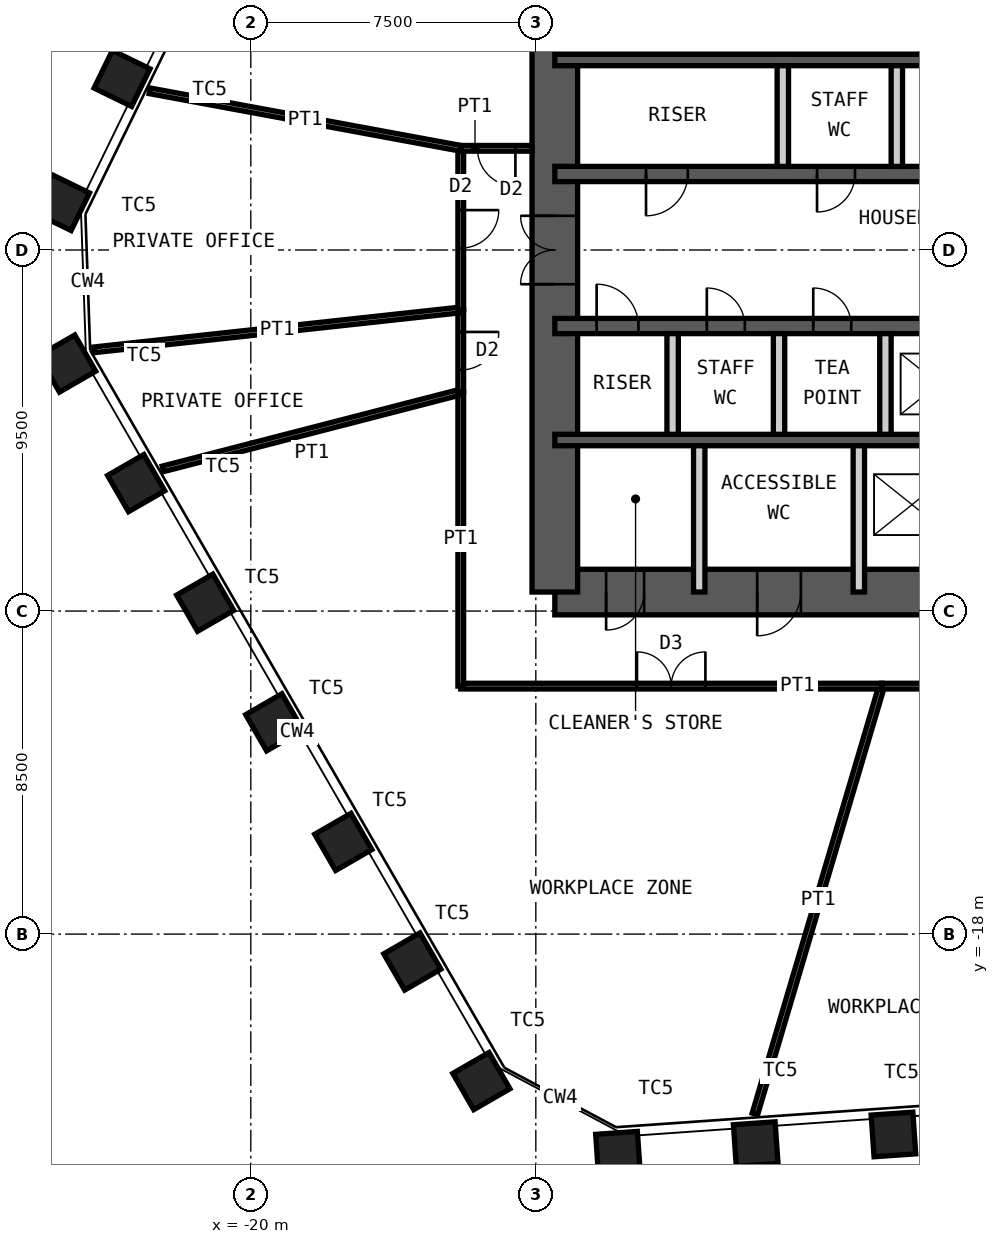
"""IFC4 building model, lengths in metres.
Left out: names, types, materials, properties, quantities, classifications, styles, units other than length and angle.
Written with IfcOpenShell. Run it as: python <this file> out.ifc"""

import sys

from ifc_helpers import new_model, si_unit, direction, frame, frame_2d, origin, origin_2d, place, context, subcontext, project, spatial, rectangle, hollow_rectangle, extrude, element, fill, save


model = new_model("IFC4")
c1 = context("Model", 3, precision=1e-05, world=origin(), true_north=direction((0.0, 1.0)))
c2 = subcontext(c1, "Body", "Model", "MODEL_VIEW")
j1 = project(units=[si_unit("LENGTHUNIT", "METRE"), si_unit("PLANEANGLEUNIT", "RADIAN")], contexts=[c1])
p1 = place(None, origin())
s1 = spatial("IfcSite", under=j1, at=p1, CompositionType="ELEMENT")
p2 = place(p1, origin())
s2 = spatial("IfcBuilding", under=s1, at=p2, CompositionType="ELEMENT")
p3 = place(p2, frame((0.0, 0.0, 205.6)))
s3 = spatial("IfcBuildingStorey", under=s2, at=p3, CompositionType="ELEMENT", Elevation=205.6)
for number, where, z_axis, x_axis in (
    (1, (-3.089, -23.272, 0.0), (0.0, 0.0, 1.0), (0.998, 0.07, 0.0)),
    (2, (-6.714, -23.526, 0.0), (0.0, 0.0, 1.0), (0.998, 0.07, 0.0)),
    (3, (-10.338, -23.779, 0.0), (0.0, 0.0, 1.0), (0.998, 0.07, 0.0)),
    (4, (-13.933, -21.868, 0.0), (0.0, 0.0, 1.0), (0.5, -0.866, 0.0)),
    (5, (-15.749, -18.721, 0.0), (0.0, 0.0, 1.0), (0.5, -0.866, 0.0)),
    (6, (-17.566, -15.574, 0.0), (0.0, 0.0, 1.0), (0.5, -0.866, 0.0)),
    (7, (-19.383, -12.428, 0.0), (0.0, 0.0, 1.0), (0.5, -0.866, 0.0)),
    (8, (-21.2, -9.281, 0.0), (0.0, 0.0, 1.0), (0.5, -0.866, 0.0)),
    (9, (-23.016, -6.134, 0.0), (0.0, 0.0, 1.0), (0.5, -0.866, 0.0)),
    (10, (-24.833, -2.988, 0.0), (0.0, 0.0, 1.0), (0.5, -0.866, 0.0)),
    (11, (-24.981, 1.248, 0.0), (0.0, 0.0, 1.0), (-0.438, -0.899, 0.0)),
    (12, (-23.388, 4.514, 0.0), (0.0, 0.0, 1.0), (-0.438, -0.899, 0.0)),
):
    element("IfcColumn", number, at=place(p3, frame(where, z_axis=z_axis, x_axis=x_axis)), inside=s3, PredefinedType="COLUMN", context=c2, shape_type="SweptSolid", body=[
        extrude(hollow_rectangle(XDim=1.1, YDim=1.1, WallThickness=0.07, at=origin_2d()), origin(), (0.0, 0.0, 1.0), 4.2),
    ])
p4 = place(p3, frame((-12.0, -9.0, 0.0), z_axis=(0.0, 0.0, 1.0), x_axis=(1.0, 0.0, 0.0)))
e13 = element("IfcWall", 13, at=p4, inside=s3, PredefinedType="SHEAR", context=c2, shape_type="SweptSolid", body=[
    extrude(rectangle(XDim=24.0, YDim=1.2, at=frame_2d((12.0, 0.0))), origin(), (0.0, 0.0, 1.0), 4.2),
])
p5 = place(p4, frame((1.35, 0.0, 0.0)))
e14 = element("IfcOpeningElement", 14, at=p5, cuts=e13, PredefinedType="OPENING", context=c2, shape_type="SweptSolid", body=[
    extrude(rectangle(XDim=1.0, YDim=2.1, at=frame_2d((0.5, 1.05))), frame((0.0, 0.61, 0.0), z_axis=(0.0, -1.0, 0.0), x_axis=(1.0, 0.0, 0.0)), (0.0, 0.0, 1.0), 1.22),
])
p6 = place(p4, frame((5.325, 0.0, 0.0)))
e15 = element("IfcOpeningElement", 15, at=p6, cuts=e13, PredefinedType="OPENING", context=c2, shape_type="SweptSolid", body=[
    extrude(rectangle(XDim=1.15, YDim=2.1, at=frame_2d((0.575, 1.05))), frame((0.0, 0.61, 0.0), z_axis=(0.0, -1.0, 0.0), x_axis=(1.0, 0.0, 0.0)), (0.0, 0.0, 1.0), 1.22),
])
p7 = place(p4, frame((12.6, 0.0, 0.0)))
e16 = element("IfcOpeningElement", 16, at=p7, cuts=e13, PredefinedType="OPENING", context=c2, shape_type="SweptSolid", body=[
    extrude(rectangle(XDim=1.0, YDim=2.1, at=frame_2d((0.5, 1.05))), frame((0.0, 0.61, 0.0), z_axis=(0.0, -1.0, 0.0), x_axis=(1.0, 0.0, 0.0)), (0.0, 0.0, 1.0), 1.22),
])
p8 = place(p3, frame((-12.0, -9.0, 0.0), z_axis=(0.0, 0.0, 1.0), x_axis=(0.0, 1.0, 0.0)))
e17 = element("IfcWall", 17, at=p8, inside=s3, PredefinedType="SHEAR", context=c2, shape_type="SweptSolid", body=[
    extrude(rectangle(XDim=18.0, YDim=1.2, at=frame_2d((9.0, 0.0))), origin(), (0.0, 0.0, 1.0), 4.2),
])
p9 = place(p8, frame((8.1, 0.0, 0.0)))
e18 = element("IfcOpeningElement", 18, at=p9, cuts=e17, PredefinedType="OPENING", context=c2, shape_type="SweptSolid", body=[
    extrude(rectangle(XDim=1.8, YDim=2.1, at=frame_2d((0.9, 1.05))), frame((0.0, 0.61, 0.0), z_axis=(0.0, -1.0, 0.0), x_axis=(1.0, 0.0, 0.0)), (0.0, 0.0, 1.0), 1.22),
])
p10 = place(p3, frame((-12.0, 5.0, 0.0), z_axis=(0.0, 0.0, 1.0), x_axis=(1.0, 0.0, 0.0)))
e19 = element("IfcWall", 19, at=p10, inside=s3, PredefinedType="SHEAR", context=c2, shape_type="SweptSolid", body=[
    extrude(rectangle(XDim=24.0, YDim=0.3, at=frame_2d((12.0, 0.0))), origin(), (0.0, 0.0, 1.0), 4.2),
])
p11 = place(p3, frame((-12.0, 2.0, 0.0), z_axis=(0.0, 0.0, 1.0), x_axis=(1.0, 0.0, 0.0)))
e20 = element("IfcWall", 20, at=p11, inside=s3, PredefinedType="SHEAR", context=c2, shape_type="SweptSolid", body=[
    extrude(rectangle(XDim=24.0, YDim=0.4, at=frame_2d((12.0, 0.0))), origin(), (0.0, 0.0, 1.0), 4.2),
])
p12 = place(p11, frame((2.4, 0.0, 0.0)))
e21 = element("IfcOpeningElement", 21, at=p12, cuts=e20, PredefinedType="OPENING", context=c2, shape_type="SweptSolid", body=[
    extrude(rectangle(XDim=1.1, YDim=2.1, at=frame_2d((0.55, 1.05))), frame((0.0, 0.21, 0.0), z_axis=(0.0, -1.0, 0.0), x_axis=(1.0, 0.0, 0.0)), (0.0, 0.0, 1.0), 0.42),
])
p13 = place(p11, frame((22.0, 0.0, 0.0)))
e22 = element("IfcOpeningElement", 22, at=p13, cuts=e20, PredefinedType="OPENING", context=c2, shape_type="SweptSolid", body=[
    extrude(rectangle(XDim=1.1, YDim=2.1, at=frame_2d((0.55, 1.05))), frame((0.0, 0.21, 0.0), z_axis=(0.0, -1.0, 0.0), x_axis=(1.0, 0.0, 0.0)), (0.0, 0.0, 1.0), 0.42),
])
p14 = place(p11, frame((10.15, 0.0, 0.0)))
e23 = element("IfcOpeningElement", 23, at=p14, cuts=e20, PredefinedType="OPENING", context=c2, shape_type="SweptSolid", body=[
    extrude(rectangle(XDim=1.0, YDim=2.1, at=frame_2d((0.5, 1.05))), frame((0.0, 0.21, 0.0), z_axis=(0.0, -1.0, 0.0), x_axis=(1.0, 0.0, 0.0)), (0.0, 0.0, 1.0), 0.42),
])
p15 = place(p11, frame((6.9, 0.0, 0.0)))
e24 = element("IfcOpeningElement", 24, at=p15, cuts=e20, PredefinedType="OPENING", context=c2, shape_type="SweptSolid", body=[
    extrude(rectangle(XDim=1.0, YDim=2.1, at=frame_2d((0.5, 1.05))), frame((0.0, 0.21, 0.0), z_axis=(0.0, -1.0, 0.0), x_axis=(1.0, 0.0, 0.0)), (0.0, 0.0, 1.0), 0.42),
])
p16 = place(p11, frame((13.35, 0.0, 0.0)))
e25 = element("IfcOpeningElement", 25, at=p16, cuts=e20, PredefinedType="OPENING", context=c2, shape_type="SweptSolid", body=[
    extrude(rectangle(XDim=1.1, YDim=2.4, at=frame_2d((0.55, 1.2))), frame((0.0, 0.21, 0.0), z_axis=(0.0, -1.0, 0.0), x_axis=(1.0, 0.0, 0.0)), (0.0, 0.0, 1.0), 0.42),
])
p17 = place(p11, frame((16.15, 0.0, 0.0)))
e26 = element("IfcOpeningElement", 26, at=p17, cuts=e20, PredefinedType="OPENING", context=c2, shape_type="SweptSolid", body=[
    extrude(rectangle(XDim=1.1, YDim=2.4, at=frame_2d((0.55, 1.2))), frame((0.0, 0.21, 0.0), z_axis=(0.0, -1.0, 0.0), x_axis=(1.0, 0.0, 0.0)), (0.0, 0.0, 1.0), 0.42),
])
p18 = place(p11, frame((18.95, 0.0, 0.0)))
e27 = element("IfcOpeningElement", 27, at=p18, cuts=e20, PredefinedType="OPENING", context=c2, shape_type="SweptSolid", body=[
    extrude(rectangle(XDim=1.1, YDim=2.4, at=frame_2d((0.55, 1.2))), frame((0.0, 0.21, 0.0), z_axis=(0.0, -1.0, 0.0), x_axis=(1.0, 0.0, 0.0)), (0.0, 0.0, 1.0), 0.42),
])
p19 = place(p3, frame((-12.0, -2.0, 0.0), z_axis=(0.0, 0.0, 1.0), x_axis=(1.0, 0.0, 0.0)))
e28 = element("IfcWall", 28, at=p19, inside=s3, PredefinedType="SHEAR", context=c2, shape_type="SweptSolid", body=[
    extrude(rectangle(XDim=24.0, YDim=0.4, at=frame_2d((12.0, 0.0))), origin(), (0.0, 0.0, 1.0), 4.2),
])
p20 = place(p19, frame((1.1, 0.0, 0.0)))
e29 = element("IfcOpeningElement", 29, at=p20, cuts=e28, PredefinedType="OPENING", context=c2, shape_type="SweptSolid", body=[
    extrude(rectangle(XDim=1.1, YDim=2.1, at=frame_2d((0.55, 1.05))), frame((0.0, 0.21, 0.0), z_axis=(0.0, -1.0, 0.0), x_axis=(1.0, 0.0, 0.0)), (0.0, 0.0, 1.0), 0.42),
])
p21 = place(p19, frame((13.55, 0.0, 0.0)))
e30 = element("IfcOpeningElement", 30, at=p21, cuts=e28, PredefinedType="OPENING", context=c2, shape_type="SweptSolid", body=[
    extrude(rectangle(XDim=1.1, YDim=2.1, at=frame_2d((0.55, 1.05))), frame((0.0, 0.21, 0.0), z_axis=(0.0, -1.0, 0.0), x_axis=(1.0, 0.0, 0.0)), (0.0, 0.0, 1.0), 0.42),
])
p22 = place(p19, frame((20.7, 0.0, 0.0)))
e31 = element("IfcOpeningElement", 31, at=p22, cuts=e28, PredefinedType="OPENING", context=c2, shape_type="SweptSolid", body=[
    extrude(rectangle(XDim=1.1, YDim=2.1, at=frame_2d((0.55, 1.05))), frame((0.0, 0.21, 0.0), z_axis=(0.0, -1.0, 0.0), x_axis=(1.0, 0.0, 0.0)), (0.0, 0.0, 1.0), 0.42),
])
p23 = place(p19, frame((4.0, 0.0, 0.0)))
e32 = element("IfcOpeningElement", 32, at=p23, cuts=e28, PredefinedType="OPENING", context=c2, shape_type="SweptSolid", body=[
    extrude(rectangle(XDim=1.0, YDim=2.1, at=frame_2d((0.5, 1.05))), frame((0.0, 0.21, 0.0), z_axis=(0.0, -1.0, 0.0), x_axis=(1.0, 0.0, 0.0)), (0.0, 0.0, 1.0), 0.42),
])
p24 = place(p19, frame((6.8, 0.0, 0.0)))
e33 = element("IfcOpeningElement", 33, at=p24, cuts=e28, PredefinedType="OPENING", context=c2, shape_type="SweptSolid", body=[
    extrude(rectangle(XDim=1.0, YDim=2.1, at=frame_2d((0.5, 1.05))), frame((0.0, 0.21, 0.0), z_axis=(0.0, -1.0, 0.0), x_axis=(1.0, 0.0, 0.0)), (0.0, 0.0, 1.0), 0.42),
])
p25 = place(p3, frame((-12.0, -5.0, 0.0), z_axis=(0.0, 0.0, 1.0), x_axis=(1.0, 0.0, 0.0)))
e34 = element("IfcWall", 34, at=p25, inside=s3, PredefinedType="SHEAR", context=c2, shape_type="SweptSolid", body=[
    extrude(rectangle(XDim=24.0, YDim=0.3, at=frame_2d((12.0, 0.0))), origin(), (0.0, 0.0, 1.0), 4.2),
])
p26 = place(p3, frame((-3.0, 5.15, 0.0), z_axis=(0.0, 0.0, 1.0), x_axis=(0.0, 1.0, 0.0)))
e35 = element("IfcWall", 35, at=p26, inside=s3, PredefinedType="PARTITIONING", context=c2, shape_type="SweptSolid", body=[
    extrude(rectangle(XDim=3.85, YDim=0.3, at=frame_2d((1.925, 0.0))), origin(), (0.0, 0.0, 1.0), 3.98),
])
p27 = place(p26, frame((1.425, 0.0, 0.0)))
e36 = element("IfcOpeningElement", 36, at=p27, cuts=e35, PredefinedType="OPENING", context=c2, shape_type="SweptSolid", body=[
    extrude(rectangle(XDim=1.0, YDim=2.1, at=frame_2d((0.5, 1.05))), frame((0.0, 0.16, 0.0), z_axis=(0.0, -1.0, 0.0), x_axis=(1.0, 0.0, 0.0)), (0.0, 0.0, 1.0), 0.32),
])
for number, where, z_axis, x_axis in (
    (37, (-6.0, 2.2, 0.0), (0.0, 0.0, 1.0), (0.0, 1.0, 0.0)),
    (38, (-3.0, 2.2, 0.0), (0.0, 0.0, 1.0), (0.0, 1.0, 0.0)),
    (39, (-8.9, -4.85, 0.0), (0.0, 0.0, 1.0), (0.0, 1.0, 0.0)),
    (40, (-6.1, -4.85, 0.0), (0.0, 0.0, 1.0), (0.0, 1.0, 0.0)),
    (41, (-3.3, -4.85, 0.0), (0.0, 0.0, 1.0), (0.0, 1.0, 0.0)),
):
    element("IfcWall", number, at=place(p3, frame(where, z_axis=z_axis, x_axis=x_axis)), inside=s3, PredefinedType="PARTITIONING", context=c2, shape_type="SweptSolid", body=[
        extrude(rectangle(XDim=2.65, YDim=0.3, at=frame_2d((1.325, 0.0))), origin(), (0.0, 0.0, 1.0), 3.98),
    ])
for number, where, z_axis, x_axis in (
    (42, (-8.2, -9.0, 0.0), (0.0, 0.0, 1.0), (0.0, 1.0, 0.0)),
    (43, (-4.0, -9.0, 0.0), (0.0, 0.0, 1.0), (0.0, 1.0, 0.0)),
):
    element("IfcWall", number, at=place(p3, frame(where, z_axis=z_axis, x_axis=x_axis)), inside=s3, PredefinedType="PARTITIONING", context=c2, shape_type="SweptSolid", body=[
        extrude(rectangle(XDim=3.85, YDim=0.3, at=frame_2d((1.925, 0.0))), origin(), (0.0, 0.0, 1.0), 3.98),
    ])
p28 = place(p3, frame((-6.734, -22.731, 0.0), z_axis=(0.0, 0.0, 1.0), x_axis=(0.284049386564, 0.958809650553, 0.0)))
e44 = element("IfcWall", 44, at=p28, inside=s3, PredefinedType="PARTITIONING", context=c2, shape_type="SweptSolid", body=[
    extrude(rectangle(XDim=11.74, YDim=0.15, at=frame_2d((5.87, 0.0))), origin(), (0.0, 0.0, 1.0), 3.33),
])
p29 = place(p3, frame((-3.399, -11.475, 0.0), z_axis=(0.0, 0.0, 1.0), x_axis=(-1.0, 0.0, 0.0)))
e45 = element("IfcWall", 45, at=p29, inside=s3, PredefinedType="PARTITIONING", context=c2, shape_type="SweptSolid", body=[
    extrude(rectangle(XDim=11.076, YDim=0.15, at=frame_2d((5.538, 0.0))), origin(), (0.0, 0.0, 1.0), 4.03),
])
p30 = place(p29, frame((4.638, 0.0, 0.0)))
e46 = element("IfcOpeningElement", 46, at=p30, cuts=e45, PredefinedType="OPENING", context=c2, shape_type="SweptSolid", body=[
    extrude(rectangle(XDim=1.8, YDim=2.4, at=frame_2d((0.9, 1.2))), frame((0.0, 0.085, 0.0), z_axis=(0.0, -1.0, 0.0), x_axis=(1.0, 0.0, 0.0)), (0.0, 0.0, 1.0), 0.17),
])
p31 = place(p3, frame((-14.475, -11.475, 0.0), z_axis=(0.0, 0.0, 1.0), x_axis=(0.0, 1.0, 0.0)))
e47 = element("IfcWall", 47, at=p31, inside=s3, PredefinedType="PARTITIONING", context=c2, shape_type="SweptSolid", body=[
    extrude(rectangle(XDim=7.739, YDim=0.15, at=frame_2d((3.87, 0.0))), origin(), (0.0, 0.0, 1.0), 4.03),
])
p32 = place(p3, frame((-22.313, -5.759, 0.0), z_axis=(0.0, 0.0, 1.0), x_axis=(0.968265788926, 0.249922712042, 0.0)))
e48 = element("IfcWall", 48, at=p32, inside=s3, PredefinedType="PARTITIONING", context=c2, shape_type="SweptSolid", body=[
    extrude(rectangle(XDim=8.095, YDim=0.15, at=frame_2d((4.048, 0.0))), origin(), (0.0, 0.0, 1.0), 3.43),
])
p33 = place(p3, frame((-14.475, -3.736, 0.0), z_axis=(0.0, 0.0, 1.0), x_axis=(0.0, 1.0, 0.0)))
e49 = element("IfcWall", 49, at=p33, inside=s3, PredefinedType="PARTITIONING", context=c2, shape_type="SweptSolid", body=[
    extrude(rectangle(XDim=2.16, YDim=0.15, at=frame_2d((1.08, 0.0))), origin(), (0.0, 0.0, 1.0), 4.03),
])
p34 = place(p33, frame((0.58, 0.0, 0.0)))
e50 = element("IfcOpeningElement", 50, at=p34, cuts=e49, PredefinedType="OPENING", context=c2, shape_type="SweptSolid", body=[
    extrude(rectangle(XDim=1.0, YDim=2.4, at=frame_2d((0.5, 1.2))), frame((0.0, 0.085, 0.0), z_axis=(0.0, -1.0, 0.0), x_axis=(1.0, 0.0, 0.0)), (0.0, 0.0, 1.0), 0.17),
])
p35 = place(p3, frame((-24.128, -2.627, 0.0), z_axis=(0.0, 0.0, 1.0), x_axis=(0.994126892449, 0.108220708326, 0.0)))
e51 = element("IfcWall", 51, at=p35, inside=s3, PredefinedType="PARTITIONING", context=c2, shape_type="SweptSolid", body=[
    extrude(rectangle(XDim=9.71, YDim=0.15, at=frame_2d((4.855, 0.0))), origin(), (0.0, 0.0, 1.0), 2.93),
])
p36 = place(p3, frame((-14.475, -1.576, 0.0), z_axis=(0.0, 0.0, 1.0), x_axis=(0.0, 1.0, 0.0)))
e52 = element("IfcWall", 52, at=p36, inside=s3, PredefinedType="PARTITIONING", context=c2, shape_type="SweptSolid", body=[
    extrude(rectangle(XDim=4.252, YDim=0.15, at=frame_2d((2.126, 0.0))), origin(), (0.0, 0.0, 1.0), 4.03),
])
p37 = place(p36, frame((1.626, 0.0, 0.0)))
e53 = element("IfcOpeningElement", 53, at=p37, cuts=e52, PredefinedType="OPENING", context=c2, shape_type="SweptSolid", body=[
    extrude(rectangle(XDim=1.0, YDim=2.4, at=frame_2d((0.5, 1.2))), frame((0.0, 0.085, 0.0), z_axis=(0.0, -1.0, 0.0), x_axis=(1.0, 0.0, 0.0)), (0.0, 0.0, 1.0), 0.17),
])
p38 = place(p3, frame((-22.661, 4.189, 0.0), z_axis=(0.0, 0.0, 1.0), x_axis=(0.983345347199, -0.181746879316, 0.0)))
e54 = element("IfcWall", 54, at=p38, inside=s3, PredefinedType="PARTITIONING", context=c2, shape_type="SweptSolid", body=[
    extrude(rectangle(XDim=8.324, YDim=0.15, at=frame_2d((4.162, 0.0))), origin(), (0.0, 0.0, 1.0), 3.43),
])
p39 = place(p3, frame((-14.475, 2.676, 0.0), z_axis=(0.0, 0.0, 1.0), x_axis=(1.0, 0.0, 0.0)))
e55 = element("IfcWall", 55, at=p39, inside=s3, PredefinedType="PARTITIONING", context=c2, shape_type="SweptSolid", body=[
    extrude(rectangle(XDim=1.875, YDim=0.15, at=frame_2d((0.938, 0.0))), origin(), (0.0, 0.0, 1.0), 3.43),
])
p40 = place(p39, frame((0.438, 0.0, 0.0)))
e56 = element("IfcOpeningElement", 56, at=p40, cuts=e55, PredefinedType="OPENING", context=c2, shape_type="SweptSolid", body=[
    extrude(rectangle(XDim=1.0, YDim=2.4, at=frame_2d((0.5, 1.2))), frame((0.0, 0.085, 0.0), z_axis=(0.0, -1.0, 0.0), x_axis=(1.0, 0.0, 0.0)), (0.0, 0.0, 1.0), 0.17),
])
p41 = place(p3, frame((0.25, -11.475, 0.0), z_axis=(0.0, 0.0, 1.0), x_axis=(-1.0, 0.0, 0.0)))
e57 = element("IfcWall", 57, at=p41, inside=s3, PredefinedType="PARTITIONING", context=c2, shape_type="SweptSolid", body=[
    extrude(rectangle(XDim=3.65, YDim=0.15, at=frame_2d((1.825, 0.0))), origin(), (0.0, 0.0, 1.0), 4.03),
])
p42 = place(p41, frame((1.325, 0.0, 0.0)))
e58 = element("IfcOpeningElement", 58, at=p42, cuts=e57, PredefinedType="OPENING", context=c2, shape_type="SweptSolid", body=[
    extrude(rectangle(XDim=1.0, YDim=2.4, at=frame_2d((0.5, 1.2))), frame((0.0, 0.085, 0.0), z_axis=(0.0, -1.0, 0.0), x_axis=(1.0, 0.0, 0.0)), (0.0, 0.0, 1.0), 0.17),
])
p43 = place(p5, origin())
e59 = element("IfcDoor", 59, at=p43, inside=s3, OperationType="SINGLE_SWING_LEFT", PredefinedType="DOOR", context=c2, shape_type="SweptSolid", body=[
    extrude(rectangle(XDim=1.0, YDim=2.1, at=frame_2d((0.5, 1.05))), frame((0.0, 0.025, 0.0), z_axis=(0.0, -1.0, 0.0), x_axis=(1.0, 0.0, 0.0)), (0.0, 0.0, 1.0), 0.05),
])
fill(e14, e59)
p44 = place(p6, origin())
e60 = element("IfcDoor", 60, at=p44, inside=s3, OperationType="SINGLE_SWING_LEFT", PredefinedType="DOOR", context=c2, shape_type="SweptSolid", body=[
    extrude(rectangle(XDim=1.15, YDim=2.1, at=frame_2d((0.575, 1.05))), frame((0.0, 0.025, 0.0), z_axis=(0.0, -1.0, 0.0), x_axis=(1.0, 0.0, 0.0)), (0.0, 0.0, 1.0), 0.05),
])
fill(e15, e60)
p45 = place(p12, origin())
e61 = element("IfcDoor", 61, at=p45, inside=s3, OperationType="SINGLE_SWING_LEFT", PredefinedType="DOOR", context=c2, shape_type="SweptSolid", body=[
    extrude(rectangle(XDim=1.1, YDim=2.1, at=frame_2d((0.55, 1.05))), frame((0.0, 0.025, 0.0), z_axis=(0.0, -1.0, 0.0), x_axis=(1.0, 0.0, 0.0)), (0.0, 0.0, 1.0), 0.05),
])
fill(e21, e61)
p46 = place(p20, origin())
e62 = element("IfcDoor", 62, at=p46, inside=s3, OperationType="SINGLE_SWING_RIGHT", PredefinedType="DOOR", context=c2, shape_type="SweptSolid", body=[
    extrude(rectangle(XDim=1.1, YDim=2.1, at=frame_2d((0.55, 1.05))), frame((0.0, 0.025, 0.0), z_axis=(0.0, -1.0, 0.0), x_axis=(1.0, 0.0, 0.0)), (0.0, 0.0, 1.0), 0.05),
])
fill(e29, e62)
p47 = place(p9, origin())
e63 = element("IfcDoor", 63, at=p47, inside=s3, OperationType="DOUBLE_DOOR_DOUBLE_SWING", PredefinedType="DOOR", context=c2, shape_type="SweptSolid", body=[
    extrude(rectangle(XDim=1.8, YDim=2.1, at=frame_2d((0.9, 1.05))), frame((0.0, 0.025, 0.0), z_axis=(0.0, -1.0, 0.0), x_axis=(1.0, 0.0, 0.0)), (0.0, 0.0, 1.0), 0.05),
])
fill(e18, e63)
p48 = place(p15, origin())
e64 = element("IfcDoor", 64, at=p48, inside=s3, OperationType="SINGLE_SWING_LEFT", PredefinedType="DOOR", context=c2, shape_type="SweptSolid", body=[
    extrude(rectangle(XDim=1.0, YDim=2.1, at=frame_2d((0.5, 1.05))), frame((0.0, 0.025, 0.0), z_axis=(0.0, -1.0, 0.0), x_axis=(1.0, 0.0, 0.0)), (0.0, 0.0, 1.0), 0.05),
])
fill(e24, e64)
p49 = place(p23, origin())
e65 = element("IfcDoor", 65, at=p49, inside=s3, OperationType="SINGLE_SWING_RIGHT", PredefinedType="DOOR", context=c2, shape_type="SweptSolid", body=[
    extrude(rectangle(XDim=1.0, YDim=2.1, at=frame_2d((0.5, 1.05))), frame((0.0, 0.025, 0.0), z_axis=(0.0, -1.0, 0.0), x_axis=(1.0, 0.0, 0.0)), (0.0, 0.0, 1.0), 0.05),
])
fill(e32, e65)
p50 = place(p24, origin())
e66 = element("IfcDoor", 66, at=p50, inside=s3, OperationType="SINGLE_SWING_RIGHT", PredefinedType="DOOR", context=c2, shape_type="SweptSolid", body=[
    extrude(rectangle(XDim=1.0, YDim=2.1, at=frame_2d((0.5, 1.05))), frame((0.0, 0.025, 0.0), z_axis=(0.0, -1.0, 0.0), x_axis=(1.0, 0.0, 0.0)), (0.0, 0.0, 1.0), 0.05),
])
fill(e33, e66)
p51 = place(p30, origin())
e67 = element("IfcDoor", 67, at=p51, inside=s3, OperationType="DOUBLE_DOOR_DOUBLE_SWING", PredefinedType="DOOR", context=c2, shape_type="SweptSolid", body=[
    extrude(rectangle(XDim=1.8, YDim=2.4, at=frame_2d((0.9, 1.2))), frame((0.0, 0.025, 0.0), z_axis=(0.0, -1.0, 0.0), x_axis=(1.0, 0.0, 0.0)), (0.0, 0.0, 1.0), 0.05),
])
fill(e46, e67)
p52 = place(p34, origin())
e68 = element("IfcDoor", 68, at=p52, inside=s3, OperationType="SINGLE_SWING_RIGHT", PredefinedType="DOOR", context=c2, shape_type="SweptSolid", body=[
    extrude(rectangle(XDim=1.0, YDim=2.4, at=frame_2d((0.5, 1.2))), frame((0.0, 0.025, 0.0), z_axis=(0.0, -1.0, 0.0), x_axis=(1.0, 0.0, 0.0)), (0.0, 0.0, 1.0), 0.05),
])
fill(e50, e68)
p53 = place(p37, origin())
e69 = element("IfcDoor", 69, at=p53, inside=s3, OperationType="SINGLE_SWING_RIGHT", PredefinedType="DOOR", context=c2, shape_type="SweptSolid", body=[
    extrude(rectangle(XDim=1.0, YDim=2.4, at=frame_2d((0.5, 1.2))), frame((0.0, 0.025, 0.0), z_axis=(0.0, -1.0, 0.0), x_axis=(1.0, 0.0, 0.0)), (0.0, 0.0, 1.0), 0.05),
])
fill(e53, e69)
p54 = place(p40, origin())
e70 = element("IfcDoor", 70, at=p54, inside=s3, OperationType="SINGLE_SWING_RIGHT", PredefinedType="DOOR", context=c2, shape_type="SweptSolid", body=[
    extrude(rectangle(XDim=1.0, YDim=2.4, at=frame_2d((0.5, 1.2))), frame((0.0, 0.025, 0.0), z_axis=(0.0, -1.0, 0.0), x_axis=(1.0, 0.0, 0.0)), (0.0, 0.0, 1.0), 0.05),
])
fill(e56, e70)
save(model, sys.argv[1])
